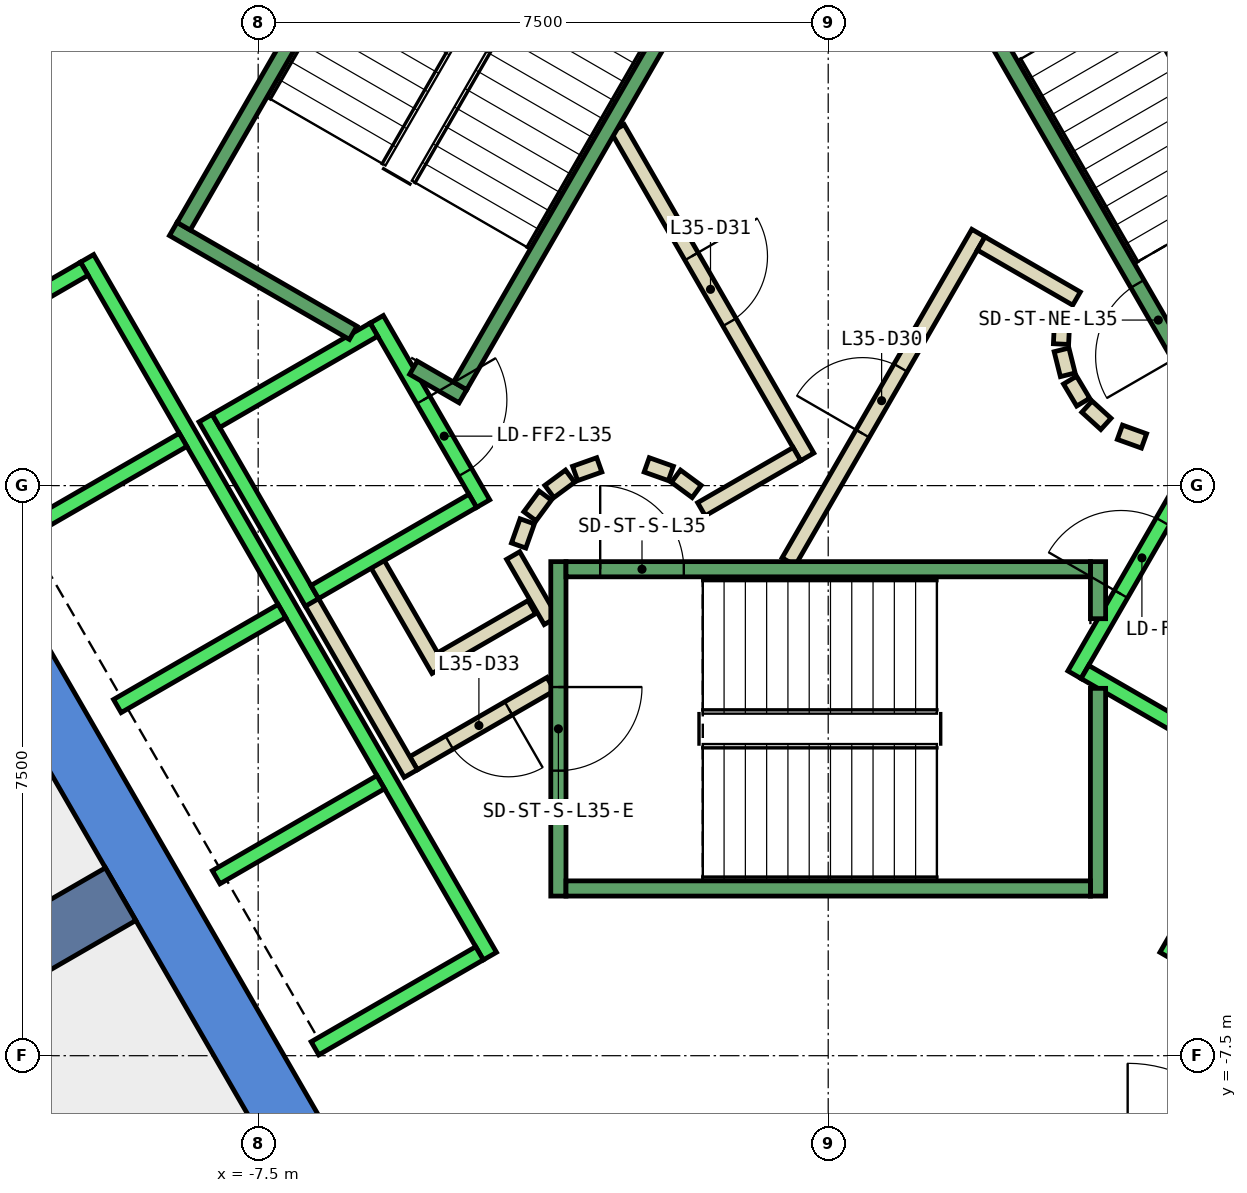
"""IFC4 building model, lengths in metres.
Left out: names, types, materials, properties, quantities, classifications, styles, units other than length and angle.
Written with IfcOpenShell. Run it as: python <this file> out.ifc"""

import sys

from ifc_helpers import new_model, si_unit, direction, frame, frame_2d, origin, place, context, subcontext, project, spatial, polyline, rectangle, outline, extrude, element, fill, save


model = new_model("IFC4")
c1 = context("Model", 3, precision=1e-05, world=origin(), true_north=direction((0.0, 1.0)))
c2 = subcontext(c1, "Body", "Model", "MODEL_VIEW")
j1 = project(units=[si_unit("LENGTHUNIT", "METRE"), si_unit("PLANEANGLEUNIT", "RADIAN")], contexts=[c1])
p1 = place(None, origin())
s1 = spatial("IfcSite", under=j1, at=p1, CompositionType="ELEMENT")
p2 = place(p1, origin())
s2 = spatial("IfcBuilding", under=s1, at=p2, CompositionType="ELEMENT")
p3 = place(p2, frame((0.0, 0.0, 159.2)))
s3 = spatial("IfcBuildingStorey", under=s2, at=p3, CompositionType="ELEMENT", Elevation=159.2)
p4 = place(p3, frame((0.0, 0.0, -0.4)))
e1 = element("IfcWall", 1, at=p4, inside=s3, PredefinedType="SHEAR", context=c2, shape_type="SweptSolid", body=[
    extrude(outline(polyline([(-12.267, 5.252), (-11.575, 4.852), (-6.466, 13.7), (-6.928, 14.5), (-12.267, 5.252)])), origin(), (0.0, 0.0, 1.0), 4.2),
])
p5 = place(p3, frame((0.0, 0.0, -0.4)))
e2 = element("IfcWall", 2, at=p5, inside=s3, PredefinedType="SHEAR", context=c2, shape_type="SweptSolid", body=[
    extrude(outline(polyline([(-13.856, 2.5), (-6.928, -9.5), (-6.466, -8.7), (-12.933, 2.5), (-13.856, 2.5)])), origin(), (0.0, 0.0, 1.0), 4.2),
])
p6 = place(p3, frame((-9.31, -5.375, -0.4), z_axis=(0.0, 0.0, 1.0), x_axis=(-0.866017533419, -0.500013631625, 0.0)))
e3 = element("IfcWall", 3, at=p6, inside=s3, PredefinedType="SHEAR", context=c2, shape_type="SweptSolid", body=[
    extrude(rectangle(XDim=9.0, YDim=0.8, at=frame_2d((4.5, 0.0))), origin(), (0.0, 0.0, 1.0), 4.2),
])
p7 = place(p3, frame((-3.9, -1.599, 0.0), z_axis=(0.0, 0.0, 1.0), x_axis=(-0.865969445389, -0.500096910261, 0.0)))
e4 = element("IfcWall", 4, at=p7, inside=s3, PredefinedType="PARTITIONING", context=c2, shape_type="SweptSolid", body=[
    extrude(rectangle(XDim=1.373, YDim=0.2, at=frame_2d((0.687, 0.0))), origin(), (0.0, 0.0, 1.0), 3.8),
])
p8 = place(p3, frame((-5.126, -2.422, 0.0), z_axis=(0.0, 0.0, 1.0), x_axis=(-0.500062241894, 0.865989465428, 0.0)))
e5 = element("IfcWall", 5, at=p8, inside=s3, PredefinedType="PARTITIONING", context=c2, shape_type="SweptSolid", body=[
    extrude(rectangle(XDim=1.7, YDim=0.2, at=frame_2d((0.85, 0.0))), origin(), (0.0, 0.0, 1.0), 3.8),
])
p9 = place(p3, frame((-3.65, -2.61, 0.0), z_axis=(0.0, 0.0, 1.0), x_axis=(-0.866072462134, -0.499918483688, 0.0)))
e6 = element("IfcWall", 6, at=p9, inside=s3, PredefinedType="PARTITIONING", context=c2, shape_type="SweptSolid", body=[
    extrude(rectangle(XDim=2.084, YDim=0.2, at=frame_2d((1.042, 0.0))), origin(), (0.0, 0.0, 1.0), 3.8),
])
p10 = place(p9, frame((0.642, 0.0, 0.0)))
e7 = element("IfcOpeningElement", 7, at=p10, cuts=e6, PredefinedType="OPENING", context=c2, shape_type="SweptSolid", body=[
    extrude(rectangle(XDim=0.9, YDim=2.1, at=frame_2d((0.45, 1.05))), frame((0.0, 0.11, 0.0), z_axis=(0.0, -1.0, 0.0), x_axis=(1.0, 0.0, 0.0)), (0.0, 0.0, 1.0), 0.22),
])
p11 = place(p3, frame((-5.492, -3.788, 0.0), z_axis=(0.0, 0.0, 1.0), x_axis=(-0.500008949224, 0.866020236886, 0.0)))
e8 = element("IfcWall", 8, at=p11, inside=s3, PredefinedType="PARTITIONING", context=c2, shape_type="SweptSolid", body=[
    extrude(rectangle(XDim=2.68, YDim=0.2, at=frame_2d((1.34, 0.0))), origin(), (0.0, 0.0, 1.0), 3.8),
])
p12 = place(p3, frame((-4.145, -0.92, 0.0), z_axis=(0.0, 0.0, 1.0), x_axis=(0.499743786207, -0.866173278362, 0.0)))
e9 = element("IfcWall", 9, at=p12, inside=s3, PredefinedType="PARTITIONING", context=c2, shape_type="SweptSolid", body=[
    extrude(rectangle(XDim=0.991, YDim=0.2, at=frame_2d((0.495, 0.0))), origin(), (0.0, 0.0, 1.0), 3.8),
])
p13 = place(p3, frame((-0.52, -1.0, 0.0), z_axis=(0.0, 0.0, 1.0), x_axis=(0.50011622646, 0.865958290007, 0.0)))
e10 = element("IfcWall", 10, at=p13, inside=s3, PredefinedType="PARTITIONING", context=c2, shape_type="SweptSolid", body=[
    extrude(rectangle(XDim=4.991, YDim=0.2, at=frame_2d((2.496, 0.0))), origin(), (0.0, 0.0, 1.0), 3.8),
])
p14 = place(p13, frame((1.945, 0.0, 0.0)))
e11 = element("IfcOpeningElement", 11, at=p14, cuts=e10, PredefinedType="OPENING", context=c2, shape_type="SweptSolid", body=[
    extrude(rectangle(XDim=1.0, YDim=2.1, at=frame_2d((0.5, 1.05))), frame((0.0, 0.11, 0.0), z_axis=(0.0, -1.0, 0.0), x_axis=(1.0, 0.0, 0.0)), (0.0, 0.0, 1.0), 0.22),
])
p15 = place(p3, frame((2.012, 3.186, 0.0), z_axis=(0.0, 0.0, 1.0), x_axis=(0.865891012941, -0.500232699559, 0.0)))
e12 = element("IfcWall", 12, at=p15, inside=s3, PredefinedType="PARTITIONING", context=c2, shape_type="SweptSolid", body=[
    extrude(rectangle(XDim=1.449, YDim=0.2, at=frame_2d((0.725, 0.0))), origin(), (0.0, 0.0, 1.0), 3.8),
])
p16 = place(p3, frame((3.079, 2.199, 0.0), z_axis=(0.0, 0.0, 1.0), x_axis=(-0.047771483479, -0.998858290933, 0.0)))
e13 = element("IfcWall", 13, at=p16, inside=s3, PredefinedType="PARTITIONING", context=c2, shape_type="SweptSolid", body=[
    extrude(rectangle(XDim=0.337, YDim=0.2, at=frame_2d((0.169, 0.0))), origin(), (0.0, 0.0, 1.0), 3.8),
])
p17 = place(p3, frame((3.07, 1.786, 0.0), z_axis=(0.0, 0.0, 1.0), x_axis=(0.242705583207, -0.970099994784, 0.0)))
e14 = element("IfcWall", 14, at=p17, inside=s3, PredefinedType="PARTITIONING", context=c2, shape_type="SweptSolid", body=[
    extrude(rectangle(XDim=0.338, YDim=0.2, at=frame_2d((0.169, 0.0))), origin(), (0.0, 0.0, 1.0), 3.8),
])
for number, where, z_axis, x_axis in (
    (15, (3.182, 1.388, 0.0), (0.0, 0.0, 1.0), (0.512, -0.859, 0.0)),
    (16, (3.404, 1.039, 0.0), (0.0, 0.0, 1.0), (0.74, -0.672, 0.0)),
):
    element("IfcWall", number, at=place(p3, frame(where, z_axis=z_axis, x_axis=x_axis)), inside=s3, PredefinedType="PARTITIONING", context=c2, shape_type="SweptSolid", body=[
        extrude(rectangle(XDim=0.338, YDim=0.2, at=frame_2d((0.169, 0.0))), origin(), (0.0, 0.0, 1.0), 3.8),
    ])
p18 = place(p3, frame((3.838, 0.702, 0.0), z_axis=(0.0, 0.0, 1.0), x_axis=(0.941035081519, -0.338308993895, 0.0)))
e17 = element("IfcWall", 17, at=p18, inside=s3, PredefinedType="PARTITIONING", context=c2, shape_type="SweptSolid", body=[
    extrude(rectangle(XDim=0.337, YDim=0.2, at=frame_2d((0.168, 0.0))), origin(), (0.0, 0.0, 1.0), 3.8),
])
p19 = place(p3, frame((-2.771, 4.7, 0.0), z_axis=(0.0, 0.0, 1.0), x_axis=(0.499969479948, -0.866043023828, 0.0)))
e18 = element("IfcWall", 18, at=p19, inside=s3, PredefinedType="PARTITIONING", context=c2, shape_type="SweptSolid", body=[
    extrude(rectangle(XDim=4.99, YDim=0.2, at=frame_2d((2.495, 0.0))), origin(), (0.0, 0.0, 1.0), 3.8),
])
p20 = place(p19, frame((1.945, 0.0, 0.0)))
e19 = element("IfcOpeningElement", 19, at=p20, cuts=e18, PredefinedType="OPENING", context=c2, shape_type="SweptSolid", body=[
    extrude(rectangle(XDim=1.0, YDim=2.1, at=frame_2d((0.5, 1.05))), frame((0.0, 0.11, 0.0), z_axis=(0.0, -1.0, 0.0), x_axis=(1.0, 0.0, 0.0)), (0.0, 0.0, 1.0), 0.22),
])
p21 = place(p3, frame((-0.412, 0.414, 0.0), z_axis=(0.0, 0.0, 1.0), x_axis=(-0.866017369001, -0.500013916395, 0.0)))
e20 = element("IfcWall", 20, at=p21, inside=s3, PredefinedType="PARTITIONING", context=c2, shape_type="SweptSolid", body=[
    extrude(rectangle(XDim=1.45, YDim=0.2, at=frame_2d((0.725, 0.0))), origin(), (0.0, 0.0, 1.0), 3.8),
])
p22 = place(p3, frame((-1.731, -0.077, 0.0), z_axis=(0.0, 0.0, 1.0), x_axis=(-0.804311165252, 0.594208338422, 0.0)))
e21 = element("IfcWall", 21, at=p22, inside=s3, PredefinedType="PARTITIONING", context=c2, shape_type="SweptSolid", body=[
    extrude(rectangle(XDim=0.338, YDim=0.2, at=frame_2d((0.169, 0.0))), origin(), (0.0, 0.0, 1.0), 3.8),
])
p23 = place(p3, frame((-2.07, 0.16, 0.0), z_axis=(0.0, 0.0, 1.0), x_axis=(-0.942199461132, 0.335052496547, 0.0)))
e22 = element("IfcWall", 22, at=p23, inside=s3, PredefinedType="PARTITIONING", context=c2, shape_type="SweptSolid", body=[
    extrude(rectangle(XDim=0.337, YDim=0.2, at=frame_2d((0.169, 0.0))), origin(), (0.0, 0.0, 1.0), 3.8),
])
p24 = place(p3, frame((-3.012, 0.273, 0.0), z_axis=(0.0, 0.0, 1.0), x_axis=(-0.942280615813, -0.334824194261, 0.0)))
e23 = element("IfcWall", 23, at=p24, inside=s3, PredefinedType="PARTITIONING", context=c2, shape_type="SweptSolid", body=[
    extrude(rectangle(XDim=0.338, YDim=0.2, at=frame_2d((0.169, 0.0))), origin(), (0.0, 0.0, 1.0), 3.8),
])
p25 = place(p3, frame((-3.397, 0.124, 0.0), z_axis=(0.0, 0.0, 1.0), x_axis=(-0.804311165252, -0.594208338422, 0.0)))
e24 = element("IfcWall", 24, at=p25, inside=s3, PredefinedType="PARTITIONING", context=c2, shape_type="SweptSolid", body=[
    extrude(rectangle(XDim=0.338, YDim=0.2, at=frame_2d((0.169, 0.0))), origin(), (0.0, 0.0, 1.0), 3.8),
])
p26 = place(p3, frame((-3.723, -0.131, 0.0), z_axis=(0.0, 0.0, 1.0), x_axis=(-0.594675113454, -0.803966112121, 0.0)))
e25 = element("IfcWall", 25, at=p26, inside=s3, PredefinedType="PARTITIONING", context=c2, shape_type="SweptSolid", body=[
    extrude(rectangle(XDim=0.338, YDim=0.2, at=frame_2d((0.169, 0.0))), origin(), (0.0, 0.0, 1.0), 3.8),
])
p27 = place(p3, frame((-3.96, -0.47, 0.0), z_axis=(0.0, 0.0, 1.0), x_axis=(-0.334824194261, -0.942280615813, 0.0)))
e26 = element("IfcWall", 26, at=p27, inside=s3, PredefinedType="PARTITIONING", context=c2, shape_type="SweptSolid", body=[
    extrude(rectangle(XDim=0.338, YDim=0.2, at=frame_2d((0.169, 0.0))), origin(), (0.0, 0.0, 1.0), 3.8),
])
p28 = place(p3, frame((-5.94, 2.188, 0.0), z_axis=(0.0, 0.0, 1.0), x_axis=(0.49994636267, -0.866056369097, 0.0)))
e27 = element("IfcWall", 27, at=p28, inside=s3, PredefinedType="STANDARD", context=c2, shape_type="SweptSolid", body=[
    extrude(rectangle(XDim=2.8, YDim=0.2, at=frame_2d((1.4, 0.0))), origin(), (0.0, 0.0, 1.0), 3.8),
])
p29 = place(p28, frame((1.225, 0.0, 0.0)))
e28 = element("IfcOpeningElement", 28, at=p29, cuts=e27, PredefinedType="OPENING", context=c2, shape_type="SweptSolid", body=[
    extrude(rectangle(XDim=1.1, YDim=2.1, at=frame_2d((0.55, 1.05))), frame((0.0, 0.11, 0.0), z_axis=(0.0, -1.0, 0.0), x_axis=(1.0, 0.0, 0.0)), (0.0, 0.0, 1.0), 0.22),
])
p30 = place(p3, frame((-8.192, 0.888, 0.0), z_axis=(0.0, 0.0, 1.0), x_axis=(0.49994636267, -0.866056369097, 0.0)))
e29 = element("IfcWall", 29, at=p30, inside=s3, PredefinedType="STANDARD", context=c2, shape_type="SweptSolid", body=[
    extrude(rectangle(XDim=2.8, YDim=0.2, at=frame_2d((1.4, 0.0))), origin(), (0.0, 0.0, 1.0), 3.8),
])
for number, where, z_axis, x_axis in (
    (30, (-5.977, 2.052, 0.0), (0.0, 0.0, 1.0), (-0.866, -0.5, 0.0)),
    (31, (-4.677, -0.2, 0.0), (0.0, 0.0, 1.0), (-0.866, -0.5, 0.0)),
):
    element("IfcWall", number, at=place(p3, frame(where, z_axis=z_axis, x_axis=x_axis)), inside=s3, PredefinedType="STANDARD", context=c2, shape_type="SweptSolid", body=[
        extrude(rectangle(XDim=2.399, YDim=0.2, at=frame_2d((1.2, 0.0))), origin(), (0.0, 0.0, 1.0), 3.8),
    ])
p31 = place(p3, frame((-9.751, 2.99, 0.0), z_axis=(0.0, 0.0, 1.0), x_axis=(0.50000090737, -0.866024879913, 0.0)))
e32 = element("IfcWall", 32, at=p31, inside=s3, PredefinedType="STANDARD", context=c2, shape_type="SweptSolid", body=[
    extrude(rectangle(XDim=10.6, YDim=0.2, at=frame_2d((5.3, 0.0))), origin(), (0.0, 0.0, 1.0), 3.8),
])
p32 = place(p3, frame((-9.788, 2.853, 0.0), z_axis=(0.0, 0.0, 1.0), x_axis=(-0.865998541277, -0.500046524342, 0.0)))
e33 = element("IfcWall", 33, at=p32, inside=s3, PredefinedType="STANDARD", context=c2, shape_type="SweptSolid", body=[
    extrude(rectangle(XDim=2.5, YDim=0.2, at=frame_2d((1.25, 0.0))), origin(), (0.0, 0.0, 1.0), 3.8),
])
for number, where, z_axis, x_axis in (
    (34, (-8.488, 0.602, 0.0), (0.0, 0.0, 1.0), (-0.866, -0.5, 0.0)),
    (35, (-7.188, -1.65, 0.0), (0.0, 0.0, 1.0), (-0.866, -0.5, 0.0)),
    (36, (-5.888, -3.902, 0.0), (0.0, 0.0, 1.0), (-0.866, -0.5, 0.0)),
    (37, (-4.588, -6.153, 0.0), (0.0, 0.0, 1.0), (-0.866, -0.5, 0.0)),
):
    element("IfcWall", number, at=place(p3, frame(where, z_axis=z_axis, x_axis=x_axis)), inside=s3, PredefinedType="STANDARD", context=c2, shape_type="SweptSolid", body=[
        extrude(rectangle(XDim=2.5, YDim=0.2, at=frame_2d((1.25, 0.0))), origin(), (0.0, 0.0, 1.0), 3.8),
    ])
p33 = place(p3, frame((3.24, -2.488, 0.0), z_axis=(0.0, 0.0, 1.0), x_axis=(0.49994636267, 0.866056369097, 0.0)))
e38 = element("IfcWall", 38, at=p33, inside=s3, PredefinedType="STANDARD", context=c2, shape_type="SweptSolid", body=[
    extrude(rectangle(XDim=2.8, YDim=0.2, at=frame_2d((1.4, 0.0))), origin(), (0.0, 0.0, 1.0), 3.8),
])
p34 = place(p33, frame((1.225, 0.0, 0.0)))
e39 = element("IfcOpeningElement", 39, at=p34, cuts=e38, PredefinedType="OPENING", context=c2, shape_type="SweptSolid", body=[
    extrude(rectangle(XDim=1.1, YDim=2.1, at=frame_2d((0.55, 1.05))), frame((0.0, 0.11, 0.0), z_axis=(0.0, -1.0, 0.0), x_axis=(1.0, 0.0, 0.0)), (0.0, 0.0, 1.0), 0.22),
])
p35 = place(p3, frame((3.377, -2.452, 0.0), z_axis=(0.0, 0.0, 1.0), x_axis=(0.865955154139, -0.50012165622, 0.0)))
e40 = element("IfcWall", 40, at=p35, inside=s3, PredefinedType="STANDARD", context=c2, shape_type="SweptSolid", body=[
    extrude(rectangle(XDim=2.4, YDim=0.2, at=frame_2d((1.2, 0.0))), origin(), (0.0, 0.0, 1.0), 3.8),
])
p36 = place(p3, frame((4.451, -6.19, 0.0), z_axis=(0.0, 0.0, 1.0), x_axis=(0.50000090737, 0.866024879913, 0.0)))
e41 = element("IfcWall", 41, at=p36, inside=s3, PredefinedType="STANDARD", context=c2, shape_type="SweptSolid", body=[
    extrude(rectangle(XDim=10.6, YDim=0.2, at=frame_2d((5.3, 0.0))), origin(), (0.0, 0.0, 1.0), 3.8),
])
p37 = place(p3, frame((-3.55, -1.0, 0.0), z_axis=(0.0, 0.0, 1.0), x_axis=(0.0, -1.0, 0.0)))
e42 = element("IfcWall", 42, at=p37, inside=s3, PredefinedType="STANDARD", context=c2, shape_type="SweptSolid", body=[
    extrude(rectangle(XDim=4.4, YDim=0.2, at=frame_2d((2.2, 0.0))), origin(), (0.0, 0.0, 1.0), 3.8),
])
p38 = place(p37, frame((1.65, 0.0, 0.0)))
e43 = element("IfcOpeningElement", 43, at=p38, cuts=e42, PredefinedType="OPENING", context=c2, shape_type="SweptSolid", body=[
    extrude(rectangle(XDim=1.1, YDim=2.2, at=frame_2d((0.55, 1.1))), frame((0.0, 0.11, 0.0), z_axis=(0.0, -1.0, 0.0), x_axis=(1.0, 0.0, 0.0)), (0.0, 0.0, 1.0), 0.22),
])
p39 = place(p3, frame((3.55, -2.667, 0.0), z_axis=(0.0, 0.0, 1.0), x_axis=(0.0, -1.0, 0.0)))
e44 = element("IfcWall", 44, at=p39, inside=s3, PredefinedType="STANDARD", context=c2, shape_type="SweptSolid", body=[
    extrude(rectangle(XDim=2.733, YDim=0.2, at=frame_2d((1.366, 0.0))), origin(), (0.0, 0.0, 1.0), 3.8),
])
p40 = place(p3, frame((3.55, -1.0, 0.0), z_axis=(0.0, 0.0, 1.0), x_axis=(0.0, -1.0, 0.0)))
e45 = element("IfcWall", 45, at=p40, inside=s3, PredefinedType="STANDARD", context=c2, shape_type="SweptSolid", body=[
    extrude(rectangle(XDim=0.751, YDim=0.2, at=frame_2d((0.375, 0.0))), origin(), (0.0, 0.0, 1.0), 3.8),
])
p41 = place(p3, frame((-3.45, -1.1, 0.0), z_axis=(0.0, 0.0, 1.0), x_axis=(1.0, 0.0, 0.0)))
e46 = element("IfcWall", 46, at=p41, inside=s3, PredefinedType="STANDARD", context=c2, shape_type="SweptSolid", body=[
    extrude(rectangle(XDim=6.9, YDim=0.2, at=frame_2d((3.45, 0.0))), origin(), (0.0, 0.0, 1.0), 3.8),
])
p42 = place(p41, frame((0.45, 0.0, 0.0)))
e47 = element("IfcOpeningElement", 47, at=p42, cuts=e46, PredefinedType="OPENING", context=c2, shape_type="SweptSolid", body=[
    extrude(rectangle(XDim=1.1, YDim=2.2, at=frame_2d((0.55, 1.1))), frame((0.0, 0.11, 0.0), z_axis=(0.0, -1.0, 0.0), x_axis=(1.0, 0.0, 0.0)), (0.0, 0.0, 1.0), 0.22),
])
p43 = place(p3, frame((-3.45, -5.3, 0.0), z_axis=(0.0, 0.0, 1.0), x_axis=(1.0, 0.0, 0.0)))
e48 = element("IfcWall", 48, at=p43, inside=s3, PredefinedType="STANDARD", context=c2, shape_type="SweptSolid", body=[
    extrude(rectangle(XDim=6.9, YDim=0.2, at=frame_2d((3.45, 0.0))), origin(), (0.0, 0.0, 1.0), 3.8),
])
p44 = place(p3, frame((4.843, 1.312, 0.0), z_axis=(0.0, 0.0, 1.0), x_axis=(-0.499963383562, 0.866046543262, 0.0)))
e49 = element("IfcWall", 49, at=p44, inside=s3, PredefinedType="STANDARD", context=c2, shape_type="SweptSolid", body=[
    extrude(rectangle(XDim=6.9, YDim=0.2, at=frame_2d((3.45, 0.0))), origin(), (0.0, 0.0, 1.0), 3.8),
])
p45 = place(p44, frame((0.45, 0.0, 0.0)))
e50 = element("IfcOpeningElement", 50, at=p45, cuts=e49, PredefinedType="OPENING", context=c2, shape_type="SweptSolid", body=[
    extrude(rectangle(XDim=1.1, YDim=2.2, at=frame_2d((0.55, 1.1))), frame((0.0, 0.11, 0.0), z_axis=(0.0, -1.0, 0.0), x_axis=(1.0, 0.0, 0.0)), (0.0, 0.0, 1.0), 0.22),
])
p46 = place(p3, frame((-6.25, 2.01, 0.0), z_axis=(0.0, 0.0, 1.0), x_axis=(-0.86611865017, 0.499838457731, 0.0)))
e51 = element("IfcWall", 51, at=p46, inside=s3, PredefinedType="STANDARD", context=c2, shape_type="SweptSolid", body=[
    extrude(rectangle(XDim=2.733, YDim=0.2, at=frame_2d((1.366, 0.0))), origin(), (0.0, 0.0, 1.0), 3.8),
])
p47 = place(p3, frame((-4.806, 1.176, 0.0), z_axis=(0.0, 0.0, 1.0), x_axis=(-0.866558586415, 0.499075361355, 0.0)))
e52 = element("IfcWall", 52, at=p47, inside=s3, PredefinedType="STANDARD", context=c2, shape_type="SweptSolid", body=[
    extrude(rectangle(XDim=0.751, YDim=0.2, at=frame_2d((0.376, 0.0))), origin(), (0.0, 0.0, 1.0), 3.8),
])
p48 = place(p3, frame((-1.393, 7.288, 0.0), z_axis=(0.0, 0.0, 1.0), x_axis=(-0.499963383562, -0.866046543262, 0.0)))
e53 = element("IfcWall", 53, at=p48, inside=s3, PredefinedType="STANDARD", context=c2, shape_type="SweptSolid", body=[
    extrude(rectangle(XDim=6.9, YDim=0.2, at=frame_2d((3.45, 0.0))), origin(), (0.0, 0.0, 1.0), 3.8),
])
p49 = place(p48, frame((0.45, 0.0, 0.0)))
e54 = element("IfcOpeningElement", 54, at=p49, cuts=e53, PredefinedType="OPENING", context=c2, shape_type="SweptSolid", body=[
    extrude(rectangle(XDim=1.1, YDim=2.2, at=frame_2d((0.55, 1.1))), frame((0.0, 0.11, 0.0), z_axis=(0.0, -1.0, 0.0), x_axis=(1.0, 0.0, 0.0)), (0.0, 0.0, 1.0), 0.22),
])
p50 = place(p3, frame((-5.03, 9.388, 0.0), z_axis=(0.0, 0.0, 1.0), x_axis=(-0.499978703459, -0.866037698999, 0.0)))
e55 = element("IfcWall", 55, at=p50, inside=s3, PredefinedType="STANDARD", context=c2, shape_type="SweptSolid", body=[
    extrude(rectangle(XDim=6.9, YDim=0.2, at=frame_2d((3.45, 0.0))), origin(), (0.0, 0.0, 1.0), 3.8),
])
p51 = place(p14, origin())
e56 = element("IfcDoor", 56, at=p51, inside=s3, OperationType="SINGLE_SWING_LEFT", PredefinedType="DOOR", context=c2, shape_type="SweptSolid", body=[
    extrude(rectangle(XDim=1.0, YDim=2.1, at=frame_2d((0.5, 1.05))), frame((0.0, 0.025, 0.0), z_axis=(0.0, -1.0, 0.0), x_axis=(1.0, 0.0, 0.0)), (0.0, 0.0, 1.0), 0.05),
])
fill(e11, e56)
p52 = place(p20, origin())
e57 = element("IfcDoor", 57, at=p52, inside=s3, OperationType="SINGLE_SWING_RIGHT", PredefinedType="DOOR", context=c2, shape_type="SweptSolid", body=[
    extrude(rectangle(XDim=1.0, YDim=2.1, at=frame_2d((0.5, 1.05))), frame((0.0, 0.025, 0.0), z_axis=(0.0, -1.0, 0.0), x_axis=(1.0, 0.0, 0.0)), (0.0, 0.0, 1.0), 0.05),
])
fill(e19, e57)
p53 = place(p10, origin())
e58 = element("IfcDoor", 58, at=p53, inside=s3, OperationType="SINGLE_SWING_LEFT", PredefinedType="DOOR", context=c2, shape_type="SweptSolid", body=[
    extrude(rectangle(XDim=0.9, YDim=2.1, at=frame_2d((0.45, 1.05))), frame((0.0, 0.025, 0.0), z_axis=(0.0, -1.0, 0.0), x_axis=(1.0, 0.0, 0.0)), (0.0, 0.0, 1.0), 0.05),
])
fill(e7, e58)
p54 = place(p34, origin())
e59 = element("IfcDoor", 59, at=p54, inside=s3, OperationType="SLIDING_TO_LEFT", PredefinedType="DOOR", context=c2, shape_type="SweptSolid", body=[
    extrude(rectangle(XDim=1.1, YDim=2.1, at=frame_2d((0.55, 1.05))), frame((0.0, 0.025, 0.0), z_axis=(0.0, -1.0, 0.0), x_axis=(1.0, 0.0, 0.0)), (0.0, 0.0, 1.0), 0.05),
])
fill(e39, e59)
p55 = place(p29, origin())
e60 = element("IfcDoor", 60, at=p55, inside=s3, OperationType="SLIDING_TO_LEFT", PredefinedType="DOOR", context=c2, shape_type="SweptSolid", body=[
    extrude(rectangle(XDim=1.1, YDim=2.1, at=frame_2d((0.55, 1.05))), frame((0.0, 0.025, 0.0), z_axis=(0.0, -1.0, 0.0), x_axis=(1.0, 0.0, 0.0)), (0.0, 0.0, 1.0), 0.05),
])
fill(e28, e60)
p56 = place(p42, origin())
e61 = element("IfcDoor", 61, at=p56, inside=s3, OperationType="SINGLE_SWING_LEFT", PredefinedType="DOOR", context=c2, shape_type="SweptSolid", body=[
    extrude(rectangle(XDim=1.1, YDim=2.2, at=frame_2d((0.55, 1.1))), frame((0.0, 0.025, 0.0), z_axis=(0.0, -1.0, 0.0), x_axis=(1.0, 0.0, 0.0)), (0.0, 0.0, 1.0), 0.05),
])
fill(e47, e61)
p57 = place(p38, origin())
e62 = element("IfcDoor", 62, at=p57, inside=s3, OperationType="SINGLE_SWING_LEFT", PredefinedType="DOOR", context=c2, shape_type="SweptSolid", body=[
    extrude(rectangle(XDim=1.1, YDim=2.2, at=frame_2d((0.55, 1.1))), frame((0.0, 0.025, 0.0), z_axis=(0.0, -1.0, 0.0), x_axis=(1.0, 0.0, 0.0)), (0.0, 0.0, 1.0), 0.05),
])
fill(e43, e62)
p58 = place(p45, origin())
e63 = element("IfcDoor", 63, at=p58, inside=s3, OperationType="SINGLE_SWING_LEFT", PredefinedType="DOOR", context=c2, shape_type="SweptSolid", body=[
    extrude(rectangle(XDim=1.1, YDim=2.2, at=frame_2d((0.55, 1.1))), frame((0.0, 0.025, 0.0), z_axis=(0.0, -1.0, 0.0), x_axis=(1.0, 0.0, 0.0)), (0.0, 0.0, 1.0), 0.05),
])
fill(e50, e63)
save(model, sys.argv[1])
